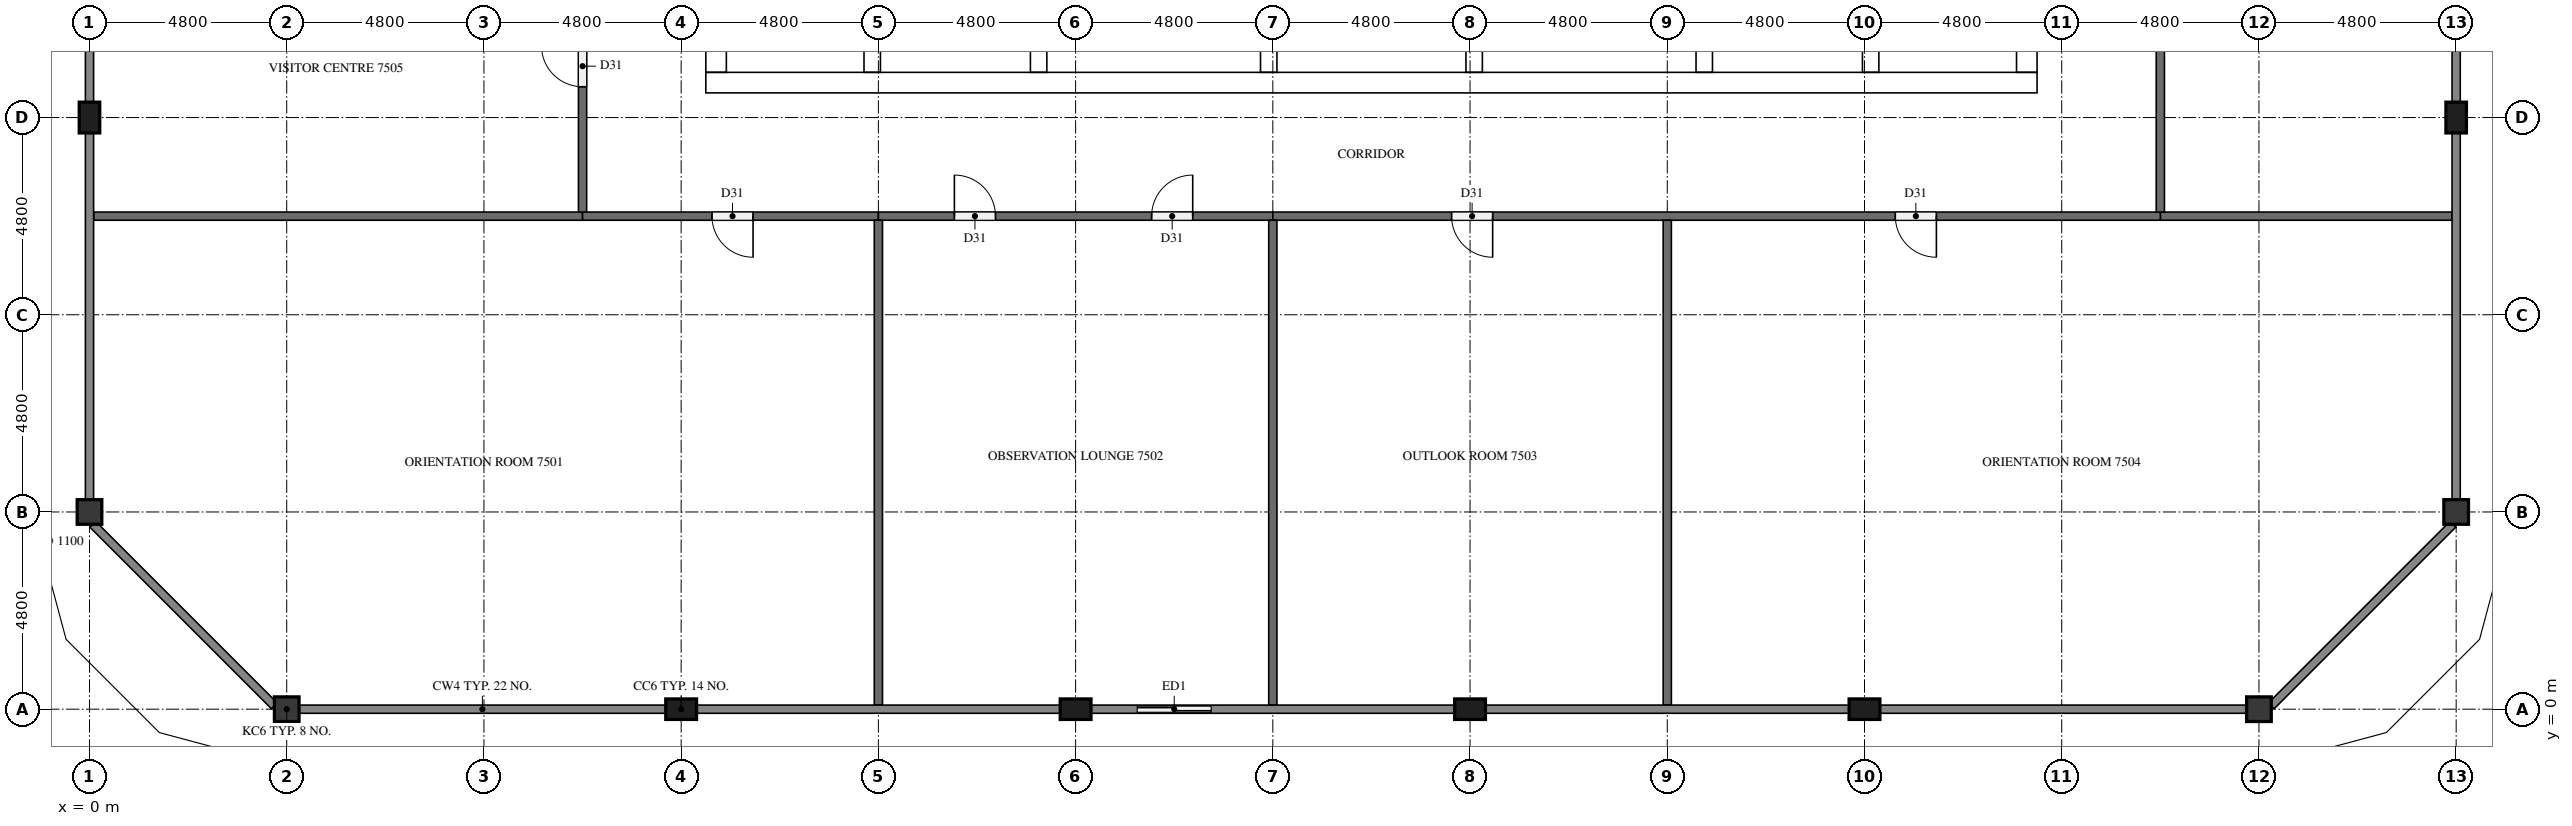
"""IFC4 building model, lengths in metres.
Left out: names, types, materials, properties, quantities, classifications, styles, units other than length and angle.
Written with IfcOpenShell. Run it as: python <this file> out.ifc"""

import sys

from ifc_helpers import new_model, si_unit, direction, frame, frame_2d, origin, origin_2d, place, context, subcontext, project, spatial, rectangle, extrude, element, fill, save


model = new_model("IFC4")
c1 = context("Model", 3, precision=1e-05, world=origin(), true_north=direction((0.0, 1.0)))
c2 = subcontext(c1, "Body", "Model", "MODEL_VIEW")
j1 = project(units=[si_unit("LENGTHUNIT", "METRE"), si_unit("PLANEANGLEUNIT", "RADIAN")], contexts=[c1])
p1 = place(None, origin())
s1 = spatial("IfcSite", under=j1, at=p1, CompositionType="ELEMENT")
p2 = place(p1, origin())
s2 = spatial("IfcBuilding", under=s1, at=p2, CompositionType="ELEMENT")
p3 = place(p2, frame((0.0, 0.0, 286.1)))
s3 = spatial("IfcBuildingStorey", under=s2, at=p3, CompositionType="ELEMENT", Elevation=286.1)
p4 = place(p3, frame((15.0, 15.25, 0.0), z_axis=(0.0, 0.0, 1.0), x_axis=(1.0, 0.0, 0.0)))
e1 = element("IfcWall", 1, at=p4, inside=s3, PredefinedType="SHEAR", context=c2, shape_type="SweptSolid", body=[
    extrude(rectangle(XDim=32.4, YDim=0.5, at=frame_2d((16.2, 0.0))), origin(), (0.0, 0.0, 1.0), 5.1),
])
p5 = place(p4, frame((15.3, 0.0, 0.0)))
e2 = element("IfcOpeningElement", 2, at=p5, cuts=e1, PredefinedType="OPENING", context=c2, shape_type="SweptSolid", body=[
    extrude(rectangle(XDim=1.8, YDim=2.1, at=frame_2d((0.9, 1.05))), frame((0.0, 0.26, 0.0), z_axis=(0.0, -1.0, 0.0), x_axis=(1.0, 0.0, 0.0)), (0.0, 0.0, 1.0), 0.52),
])
p6 = place(p3, frame((15.25, 15.5, 0.0), z_axis=(0.0, 0.0, 1.0), x_axis=(0.0, 1.0, 0.0)))
e3 = element("IfcWall", 3, at=p6, inside=s3, PredefinedType="SHEAR", context=c2, shape_type="SweptSolid", body=[
    extrude(rectangle(XDim=21.8, YDim=0.5, at=frame_2d((10.9, 0.0))), origin(), (0.0, 0.0, 1.0), 5.1),
])
p7 = place(p6, frame((5.26, 0.0, 0.0)))
e4 = element("IfcOpeningElement", 4, at=p7, cuts=e3, PredefinedType="OPENING", context=c2, shape_type="SweptSolid", body=[
    extrude(rectangle(XDim=1.2, YDim=2.1, at=frame_2d((0.6, 1.05))), frame((0.0, 0.26, 0.0), z_axis=(0.0, -1.0, 0.0), x_axis=(1.0, 0.0, 0.0)), (0.0, 0.0, 1.0), 0.52),
])
p8 = place(p3, frame((47.15, 15.5, 0.0), z_axis=(0.0, 0.0, 1.0), x_axis=(0.0, 1.0, 0.0)))
e5 = element("IfcWall", 5, at=p8, inside=s3, PredefinedType="SHEAR", context=c2, shape_type="SweptSolid", body=[
    extrude(rectangle(XDim=21.8, YDim=0.5, at=frame_2d((10.9, 0.0))), origin(), (0.0, 0.0, 1.0), 5.1),
])
p9 = place(p8, frame((10.6, 0.0, 0.0)))
e6 = element("IfcOpeningElement", 6, at=p9, cuts=e5, PredefinedType="OPENING", context=c2, shape_type="SweptSolid", body=[
    extrude(rectangle(XDim=1.2, YDim=2.1, at=frame_2d((0.6, 1.05))), frame((0.0, 0.26, 0.0), z_axis=(0.0, -1.0, 0.0), x_axis=(1.0, 0.0, 0.0)), (0.0, 0.0, 1.0), 0.52),
])
p10 = place(p3, frame((19.05, 15.5, 0.0), z_axis=(0.0, 0.0, 1.0), x_axis=(0.0, 1.0, 0.0)))
e7 = element("IfcWall", 7, at=p10, inside=s3, PredefinedType="SHEAR", context=c2, shape_type="SweptSolid", body=[
    extrude(rectangle(XDim=15.55, YDim=0.4, at=frame_2d((7.775, 0.0))), origin(), (0.0, 0.0, 1.0), 5.1),
])
p11 = place(p10, frame((9.95, 0.0, 0.0)))
e8 = element("IfcOpeningElement", 8, at=p11, cuts=e7, PredefinedType="OPENING", context=c2, shape_type="SweptSolid", body=[
    extrude(rectangle(XDim=1.1, YDim=2.1, at=frame_2d((0.55, 1.05))), frame((0.0, 0.21, 0.0), z_axis=(0.0, -1.0, 0.0), x_axis=(1.0, 0.0, 0.0)), (0.0, 0.0, 1.0), 0.42),
])
p12 = place(p10, frame((13.45, 0.0, 0.0)))
e9 = element("IfcOpeningElement", 9, at=p12, cuts=e7, PredefinedType="OPENING", context=c2, shape_type="SweptSolid", body=[
    extrude(rectangle(XDim=1.1, YDim=2.1, at=frame_2d((0.55, 1.05))), frame((0.0, 0.21, 0.0), z_axis=(0.0, -1.0, 0.0), x_axis=(1.0, 0.0, 0.0)), (0.0, 0.0, 1.0), 0.42),
])
p13 = place(p10, frame((0.7, 0.0, 0.0)))
e10 = element("IfcOpeningElement", 10, at=p13, cuts=e7, PredefinedType="OPENING", context=c2, shape_type="SweptSolid", body=[
    extrude(rectangle(XDim=1.2, YDim=2.1, at=frame_2d((0.6, 1.05))), frame((0.0, 0.21, 0.0), z_axis=(0.0, -1.0, 0.0), x_axis=(1.0, 0.0, 0.0)), (0.0, 0.0, 1.0), 0.42),
])
p14 = place(p3, frame((23.1, 15.5, 0.0), z_axis=(0.0, 0.0, 1.0), x_axis=(0.0, 1.0, 0.0)))
e11 = element("IfcWall", 11, at=p14, inside=s3, PredefinedType="SHEAR", context=c2, shape_type="SweptSolid", body=[
    extrude(rectangle(XDim=21.8, YDim=0.4, at=frame_2d((10.9, 0.0))), origin(), (0.0, 0.0, 1.0), 5.1),
])
p15 = place(p3, frame((39.3, 15.5, 0.0), z_axis=(0.0, 0.0, 1.0), x_axis=(0.0, 1.0, 0.0)))
e12 = element("IfcWall", 12, at=p15, inside=s3, PredefinedType="SHEAR", context=c2, shape_type="SweptSolid", body=[
    extrude(rectangle(XDim=8.75, YDim=0.4, at=frame_2d((4.375, 0.0))), origin(), (0.0, 0.0, 1.0), 5.1),
])
p16 = place(p3, frame((43.35, 15.5, 0.0), z_axis=(0.0, 0.0, 1.0), x_axis=(0.0, 1.0, 0.0)))
e13 = element("IfcWall", 13, at=p16, inside=s3, PredefinedType="SHEAR", context=c2, shape_type="SweptSolid", body=[
    extrude(rectangle(XDim=8.75, YDim=0.4, at=frame_2d((4.375, 0.0))), origin(), (0.0, 0.0, 1.0), 5.1),
])
p17 = place(p16, frame((0.7, 0.0, 0.0)))
e14 = element("IfcOpeningElement", 14, at=p17, cuts=e13, PredefinedType="OPENING", context=c2, shape_type="SweptSolid", body=[
    extrude(rectangle(XDim=1.2, YDim=2.1, at=frame_2d((0.6, 1.05))), frame((0.0, 0.21, 0.0), z_axis=(0.0, -1.0, 0.0), x_axis=(1.0, 0.0, 0.0)), (0.0, 0.0, 1.0), 0.42),
])
for number, where, z_axis, x_axis in (
    (15, (28.7, 15.5, 0.0), (0.0, 0.0, 1.0), (0.0, 1.0, 0.0)),
    (16, (33.7, 15.5, 0.0), (0.0, 0.0, 1.0), (0.0, 1.0, 0.0)),
):
    element("IfcWall", number, at=place(p3, frame(where, z_axis=z_axis, x_axis=x_axis)), inside=s3, PredefinedType="SHEAR", context=c2, shape_type="SweptSolid", body=[
        extrude(rectangle(XDim=3.05, YDim=0.4, at=frame_2d((1.525, 0.0))), origin(), (0.0, 0.0, 1.0), 5.1),
    ])
p18 = place(p3, frame((4.8, 0.0, 0.0), z_axis=(0.0, 0.0, 1.0), x_axis=(1.0, 0.0, 0.0)))
e17 = element("IfcColumn", 17, at=p18, inside=s3, PredefinedType="COLUMN", context=c2, shape_type="SweptSolid", body=[
    extrude(rectangle(XDim=0.6, YDim=0.6, at=origin_2d()), origin(), (0.0, 0.0, 1.0), 5.1),
])
for number, where, z_axis, x_axis in (
    (18, (14.4, 0.0, 0.0), (0.0, 0.0, 1.0), (1.0, 0.0, 0.0)),
    (19, (24.0, 0.0, 0.0), (0.0, 0.0, 1.0), (1.0, 0.0, 0.0)),
    (20, (33.6, 0.0, 0.0), (0.0, 0.0, 1.0), (1.0, 0.0, 0.0)),
    (21, (43.2, 0.0, 0.0), (0.0, 0.0, 1.0), (1.0, 0.0, 0.0)),
):
    element("IfcColumn", number, at=place(p3, frame(where, z_axis=z_axis, x_axis=x_axis)), inside=s3, PredefinedType="COLUMN", context=c2, shape_type="SweptSolid", body=[
        extrude(rectangle(XDim=0.75, YDim=0.5, at=origin_2d()), origin(), (0.0, 0.0, 1.0), 5.1),
    ])
for number, where, z_axis, x_axis in (
    (22, (52.8, 0.0, 0.0), (0.0, 0.0, 1.0), (1.0, 0.0, 0.0)),
    (23, (57.6, 4.8, 0.0), (0.0, 0.0, 1.0), (1.0, 0.0, 0.0)),
):
    element("IfcColumn", number, at=place(p3, frame(where, z_axis=z_axis, x_axis=x_axis)), inside=s3, PredefinedType="COLUMN", context=c2, shape_type="SweptSolid", body=[
        extrude(rectangle(XDim=0.6, YDim=0.6, at=origin_2d()), origin(), (0.0, 0.0, 1.0), 5.1),
    ])
for number, where, z_axis, x_axis in (
    (24, (57.6, 14.4, 0.0), (0.0, 0.0, 1.0), (0.0, 1.0, 0.0)),
    (25, (0.0, 14.4, 0.0), (0.0, 0.0, 1.0), (0.0, 1.0, 0.0)),
):
    element("IfcColumn", number, at=place(p3, frame(where, z_axis=z_axis, x_axis=x_axis)), inside=s3, PredefinedType="COLUMN", context=c2, shape_type="SweptSolid", body=[
        extrude(rectangle(XDim=0.75, YDim=0.5, at=origin_2d()), origin(), (0.0, 0.0, 1.0), 5.1),
    ])
p19 = place(p3, frame((0.0, 4.8, 0.0), z_axis=(0.0, 0.0, 1.0), x_axis=(1.0, 0.0, 0.0)))
e26 = element("IfcColumn", 26, at=p19, inside=s3, PredefinedType="COLUMN", context=c2, shape_type="SweptSolid", body=[
    extrude(rectangle(XDim=0.6, YDim=0.6, at=origin_2d()), origin(), (0.0, 0.0, 1.0), 5.1),
])
p20 = place(p3, frame((25.2, 0.0, 0.0), z_axis=(0.0, 0.0, 1.0), x_axis=(1.0, 0.0, 0.0)))
e27 = element("IfcWall", 27, at=p20, inside=s3, PredefinedType="SOLIDWALL", context=c2, shape_type="SweptSolid", body=[
    extrude(rectangle(XDim=2.4, YDim=0.15, at=frame_2d((1.2, 0.0))), origin(), (0.0, 0.0, 1.0), 5.1),
])
p21 = place(p20, frame((0.3, 0.0, 0.0)))
e28 = element("IfcOpeningElement", 28, at=p21, cuts=e27, PredefinedType="OPENING", context=c2, shape_type="SweptSolid", body=[
    extrude(rectangle(XDim=1.8, YDim=2.4, at=frame_2d((0.9, 1.2))), frame((0.0, 0.085, 0.0), z_axis=(0.0, -1.0, 0.0), x_axis=(1.0, 0.0, 0.0)), (0.0, 0.0, 1.0), 0.17),
])
p22 = place(p3, frame((0.1, 12.0, 0.0), z_axis=(0.0, 0.0, 1.0), x_axis=(1.0, 0.0, 0.0)))
e29 = element("IfcWall", 29, at=p22, inside=s3, PredefinedType="PARTITIONING", context=c2, shape_type="SweptSolid", body=[
    extrude(rectangle(XDim=11.9, YDim=0.2, at=frame_2d((5.95, 0.0))), origin(), (0.0, 0.0, 1.0), 5.1),
])
p23 = place(p3, frame((50.4, 12.0, 0.0), z_axis=(0.0, 0.0, 1.0), x_axis=(1.0, 0.0, 0.0)))
e30 = element("IfcWall", 30, at=p23, inside=s3, PredefinedType="PARTITIONING", context=c2, shape_type="SweptSolid", body=[
    extrude(rectangle(XDim=7.1, YDim=0.2, at=frame_2d((3.55, 0.0))), origin(), (0.0, 0.0, 1.0), 5.1),
])
p24 = place(p3, frame((19.2, 12.0, 0.0), z_axis=(0.0, 0.0, 1.0), x_axis=(-1.0, 0.0, 0.0)))
e31 = element("IfcWall", 31, at=p24, inside=s3, PredefinedType="PARTITIONING", context=c2, shape_type="SweptSolid", body=[
    extrude(rectangle(XDim=7.2, YDim=0.2, at=frame_2d((3.6, 0.0))), origin(), (0.0, 0.0, 1.0), 5.1),
])
p25 = place(p24, frame((3.05, 0.0, 0.0)))
e32 = element("IfcOpeningElement", 32, at=p25, cuts=e31, PredefinedType="OPENING", context=c2, shape_type="SweptSolid", body=[
    extrude(rectangle(XDim=1.0, YDim=2.1, at=frame_2d((0.5, 1.05))), frame((0.0, 0.11, 0.0), z_axis=(0.0, -1.0, 0.0), x_axis=(1.0, 0.0, 0.0)), (0.0, 0.0, 1.0), 0.22),
])
p26 = place(p3, frame((19.2, 12.0, 0.0), z_axis=(0.0, 0.0, 1.0), x_axis=(1.0, 0.0, 0.0)))
e33 = element("IfcWall", 33, at=p26, inside=s3, PredefinedType="PARTITIONING", context=c2, shape_type="SweptSolid", body=[
    extrude(rectangle(XDim=9.6, YDim=0.2, at=frame_2d((4.8, 0.0))), origin(), (0.0, 0.0, 1.0), 5.1),
])
p27 = place(p26, frame((6.65, 0.0, 0.0)))
e34 = element("IfcOpeningElement", 34, at=p27, cuts=e33, PredefinedType="OPENING", context=c2, shape_type="SweptSolid", body=[
    extrude(rectangle(XDim=1.0, YDim=2.1, at=frame_2d((0.5, 1.05))), frame((0.0, 0.11, 0.0), z_axis=(0.0, -1.0, 0.0), x_axis=(1.0, 0.0, 0.0)), (0.0, 0.0, 1.0), 0.22),
])
p28 = place(p26, frame((1.85, 0.0, 0.0)))
e35 = element("IfcOpeningElement", 35, at=p28, cuts=e33, PredefinedType="OPENING", context=c2, shape_type="SweptSolid", body=[
    extrude(rectangle(XDim=1.0, YDim=2.1, at=frame_2d((0.5, 1.05))), frame((0.0, 0.11, 0.0), z_axis=(0.0, -1.0, 0.0), x_axis=(1.0, 0.0, 0.0)), (0.0, 0.0, 1.0), 0.22),
])
p29 = place(p3, frame((50.4, 12.0, 0.0), z_axis=(0.0, 0.0, 1.0), x_axis=(-1.0, 0.0, 0.0)))
e36 = element("IfcWall", 36, at=p29, inside=s3, PredefinedType="PARTITIONING", context=c2, shape_type="SweptSolid", body=[
    extrude(rectangle(XDim=21.6, YDim=0.2, at=frame_2d((10.8, 0.0))), origin(), (0.0, 0.0, 1.0), 5.1),
])
p30 = place(p29, frame((16.25, 0.0, 0.0)))
e37 = element("IfcOpeningElement", 37, at=p30, cuts=e36, PredefinedType="OPENING", context=c2, shape_type="SweptSolid", body=[
    extrude(rectangle(XDim=1.0, YDim=2.1, at=frame_2d((0.5, 1.05))), frame((0.0, 0.11, 0.0), z_axis=(0.0, -1.0, 0.0), x_axis=(1.0, 0.0, 0.0)), (0.0, 0.0, 1.0), 0.22),
])
p31 = place(p29, frame((5.45, 0.0, 0.0)))
e38 = element("IfcOpeningElement", 38, at=p31, cuts=e36, PredefinedType="OPENING", context=c2, shape_type="SweptSolid", body=[
    extrude(rectangle(XDim=1.0, YDim=2.1, at=frame_2d((0.5, 1.05))), frame((0.0, 0.11, 0.0), z_axis=(0.0, -1.0, 0.0), x_axis=(1.0, 0.0, 0.0)), (0.0, 0.0, 1.0), 0.22),
])
p32 = place(p3, frame((12.0, 12.1, 0.0), z_axis=(0.0, 0.0, 1.0), x_axis=(0.0, 1.0, 0.0)))
e39 = element("IfcWall", 39, at=p32, inside=s3, PredefinedType="PARTITIONING", context=c2, shape_type="SweptSolid", body=[
    extrude(rectangle(XDim=28.6, YDim=0.2, at=frame_2d((14.3, 0.0))), origin(), (0.0, 0.0, 1.0), 5.1),
])
p33 = place(p32, frame((3.05, 0.0, 0.0)))
e40 = element("IfcOpeningElement", 40, at=p33, cuts=e39, PredefinedType="OPENING", context=c2, shape_type="SweptSolid", body=[
    extrude(rectangle(XDim=1.0, YDim=2.1, at=frame_2d((0.5, 1.05))), frame((0.0, 0.11, 0.0), z_axis=(0.0, -1.0, 0.0), x_axis=(1.0, 0.0, 0.0)), (0.0, 0.0, 1.0), 0.22),
])
p34 = place(p32, frame((11.45, 0.0, 0.0)))
e41 = element("IfcOpeningElement", 41, at=p34, cuts=e39, PredefinedType="OPENING", context=c2, shape_type="SweptSolid", body=[
    extrude(rectangle(XDim=1.0, YDim=2.1, at=frame_2d((0.5, 1.05))), frame((0.0, 0.11, 0.0), z_axis=(0.0, -1.0, 0.0), x_axis=(1.0, 0.0, 0.0)), (0.0, 0.0, 1.0), 0.22),
])
p35 = place(p32, frame((22.15, 0.0, 0.0)))
e42 = element("IfcOpeningElement", 42, at=p35, cuts=e39, PredefinedType="OPENING", context=c2, shape_type="SweptSolid", body=[
    extrude(rectangle(XDim=1.0, YDim=2.1, at=frame_2d((0.5, 1.05))), frame((0.0, 0.11, 0.0), z_axis=(0.0, -1.0, 0.0), x_axis=(1.0, 0.0, 0.0)), (0.0, 0.0, 1.0), 0.22),
])
for number, where, z_axis, x_axis in (
    (43, (19.2, 0.1, 0.0), (0.0, 0.0, 1.0), (0.0, 1.0, 0.0)),
    (44, (28.8, 0.1, 0.0), (0.0, 0.0, 1.0), (0.0, 1.0, 0.0)),
    (45, (38.4, 0.1, 0.0), (0.0, 0.0, 1.0), (0.0, 1.0, 0.0)),
):
    element("IfcWall", number, at=place(p3, frame(where, z_axis=z_axis, x_axis=x_axis)), inside=s3, PredefinedType="PARTITIONING", context=c2, shape_type="SweptSolid", body=[
        extrude(rectangle(XDim=11.8, YDim=0.2, at=frame_2d((5.9, 0.0))), origin(), (0.0, 0.0, 1.0), 5.1),
    ])
p36 = place(p3, frame((50.4, 40.7, 0.0), z_axis=(0.0, 0.0, 1.0), x_axis=(0.0, -1.0, 0.0)))
e46 = element("IfcWall", 46, at=p36, inside=s3, PredefinedType="PARTITIONING", context=c2, shape_type="SweptSolid", body=[
    extrude(rectangle(XDim=28.6, YDim=0.2, at=frame_2d((14.3, 0.0))), origin(), (0.0, 0.0, 1.0), 5.1),
])
p37 = place(p36, frame((22.15, 0.0, 0.0)))
e47 = element("IfcOpeningElement", 47, at=p37, cuts=e46, PredefinedType="OPENING", context=c2, shape_type="SweptSolid", body=[
    extrude(rectangle(XDim=1.0, YDim=2.1, at=frame_2d((0.5, 1.05))), frame((0.0, 0.11, 0.0), z_axis=(0.0, -1.0, 0.0), x_axis=(1.0, 0.0, 0.0)), (0.0, 0.0, 1.0), 0.22),
])
p38 = place(p36, frame((11.45, 0.0, 0.0)))
e48 = element("IfcOpeningElement", 48, at=p38, cuts=e46, PredefinedType="OPENING", context=c2, shape_type="SweptSolid", body=[
    extrude(rectangle(XDim=1.0, YDim=2.1, at=frame_2d((0.5, 1.05))), frame((0.0, 0.11, 0.0), z_axis=(0.0, -1.0, 0.0), x_axis=(1.0, 0.0, 0.0)), (0.0, 0.0, 1.0), 0.22),
])
p39 = place(p36, frame((3.05, 0.0, 0.0)))
e49 = element("IfcOpeningElement", 49, at=p39, cuts=e46, PredefinedType="OPENING", context=c2, shape_type="SweptSolid", body=[
    extrude(rectangle(XDim=1.0, YDim=2.1, at=frame_2d((0.5, 1.05))), frame((0.0, 0.11, 0.0), z_axis=(0.0, -1.0, 0.0), x_axis=(1.0, 0.0, 0.0)), (0.0, 0.0, 1.0), 0.22),
])
p40 = place(p21, origin())
e50 = element("IfcDoor", 50, at=p40, inside=s3, OperationType="SLIDING_TO_LEFT", PredefinedType="DOOR", context=c2, shape_type="SweptSolid", body=[
    extrude(rectangle(XDim=1.8, YDim=2.4, at=frame_2d((0.9, 1.2))), frame((0.0, 0.025, 0.0), z_axis=(0.0, -1.0, 0.0), x_axis=(1.0, 0.0, 0.0)), (0.0, 0.0, 1.0), 0.05),
])
fill(e28, e50)
p41 = place(p5, frame((1.8, 0.0, 0.0), z_axis=(0.0, 0.0, 1.0), x_axis=(-1.0, 0.0, 0.0)))
e51 = element("IfcDoor", 51, at=p41, inside=s3, OperationType="DOUBLE_DOOR_SINGLE_SWING", PredefinedType="DOOR", context=c2, shape_type="SweptSolid", body=[
    extrude(rectangle(XDim=1.8, YDim=2.1, at=frame_2d((0.9, 1.05))), frame((0.0, 0.025, 0.0), z_axis=(0.0, -1.0, 0.0), x_axis=(1.0, 0.0, 0.0)), (0.0, 0.0, 1.0), 0.05),
])
fill(e2, e51)
p42 = place(p25, origin())
e52 = element("IfcDoor", 52, at=p42, inside=s3, OperationType="SINGLE_SWING_LEFT", PredefinedType="DOOR", context=c2, shape_type="SweptSolid", body=[
    extrude(rectangle(XDim=1.0, YDim=2.1, at=frame_2d((0.5, 1.05))), frame((0.0, 0.025, 0.0), z_axis=(0.0, -1.0, 0.0), x_axis=(1.0, 0.0, 0.0)), (0.0, 0.0, 1.0), 0.05),
])
fill(e32, e52)
p43 = place(p27, origin())
e53 = element("IfcDoor", 53, at=p43, inside=s3, OperationType="SINGLE_SWING_RIGHT", PredefinedType="DOOR", context=c2, shape_type="SweptSolid", body=[
    extrude(rectangle(XDim=1.0, YDim=2.1, at=frame_2d((0.5, 1.05))), frame((0.0, 0.025, 0.0), z_axis=(0.0, -1.0, 0.0), x_axis=(1.0, 0.0, 0.0)), (0.0, 0.0, 1.0), 0.05),
])
fill(e34, e53)
p44 = place(p28, origin())
e54 = element("IfcDoor", 54, at=p44, inside=s3, OperationType="SINGLE_SWING_LEFT", PredefinedType="DOOR", context=c2, shape_type="SweptSolid", body=[
    extrude(rectangle(XDim=1.0, YDim=2.1, at=frame_2d((0.5, 1.05))), frame((0.0, 0.025, 0.0), z_axis=(0.0, -1.0, 0.0), x_axis=(1.0, 0.0, 0.0)), (0.0, 0.0, 1.0), 0.05),
])
fill(e35, e54)
p45 = place(p30, origin())
e55 = element("IfcDoor", 55, at=p45, inside=s3, OperationType="SINGLE_SWING_LEFT", PredefinedType="DOOR", context=c2, shape_type="SweptSolid", body=[
    extrude(rectangle(XDim=1.0, YDim=2.1, at=frame_2d((0.5, 1.05))), frame((0.0, 0.025, 0.0), z_axis=(0.0, -1.0, 0.0), x_axis=(1.0, 0.0, 0.0)), (0.0, 0.0, 1.0), 0.05),
])
fill(e37, e55)
p46 = place(p31, origin())
e56 = element("IfcDoor", 56, at=p46, inside=s3, OperationType="SINGLE_SWING_LEFT", PredefinedType="DOOR", context=c2, shape_type="SweptSolid", body=[
    extrude(rectangle(XDim=1.0, YDim=2.1, at=frame_2d((0.5, 1.05))), frame((0.0, 0.025, 0.0), z_axis=(0.0, -1.0, 0.0), x_axis=(1.0, 0.0, 0.0)), (0.0, 0.0, 1.0), 0.05),
])
fill(e38, e56)
p47 = place(p33, origin())
e57 = element("IfcDoor", 57, at=p47, inside=s3, OperationType="SINGLE_SWING_RIGHT", PredefinedType="DOOR", context=c2, shape_type="SweptSolid", body=[
    extrude(rectangle(XDim=1.0, YDim=2.1, at=frame_2d((0.5, 1.05))), frame((0.0, 0.025, 0.0), z_axis=(0.0, -1.0, 0.0), x_axis=(1.0, 0.0, 0.0)), (0.0, 0.0, 1.0), 0.05),
])
fill(e40, e57)
save(model, sys.argv[1])
